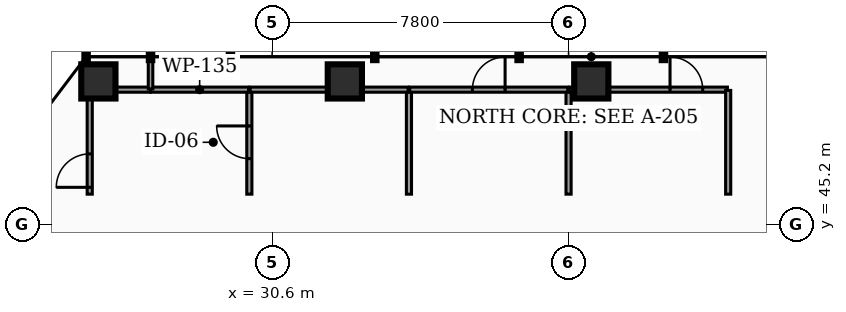
"""IFC4 building model, lengths in metres.
Left out: names, types, materials, properties, quantities, classifications, styles, units other than length and angle.
Written with IfcOpenShell. Run it as: python <this file> out.ifc"""

import sys

from ifc_helpers import new_model, si_unit, direction, frame, frame_2d, origin, origin_2d, place, context, subcontext, project, spatial, rectangle, hollow_rectangle, extrude, element, fill, save


model = new_model("IFC4")
c1 = context("Model", 3, precision=1e-05, world=origin(), true_north=direction((0.0, 1.0)))
c2 = subcontext(c1, "Body", "Model", "MODEL_VIEW")
j1 = project(units=[si_unit("LENGTHUNIT", "METRE"), si_unit("PLANEANGLEUNIT", "RADIAN")], contexts=[c1])
p1 = place(None, origin())
s1 = spatial("IfcSite", under=j1, at=p1, CompositionType="ELEMENT")
p2 = place(p1, origin())
s2 = spatial("IfcBuilding", under=s1, at=p2, CompositionType="ELEMENT")
p3 = place(p2, frame((0.0, 0.0, 88.74)))
s3 = spatial("IfcBuildingStorey", under=s2, at=p3, CompositionType="ELEMENT", Elevation=88.74)
for number, where, z_axis, x_axis in (
    (1, (38.998, 48.967, 0.0), (0.0, 0.0, 1.0), (1.0, 0.0, 0.0)),
    (2, (32.513, 48.967, 0.0), (0.0, 0.0, 1.0), (1.0, 0.0, 0.0)),
    (3, (26.028, 48.967, 0.0), (0.0, 0.0, 1.0), (1.0, 0.0, 0.0)),
):
    element("IfcColumn", number, at=place(p3, frame(where, z_axis=z_axis, x_axis=x_axis)), inside=s3, PredefinedType="COLUMN", context=c2, shape_type="SweptSolid", body=[
        extrude(hollow_rectangle(XDim=0.9, YDim=0.9, WallThickness=0.045, at=origin_2d()), origin(), (0.0, 0.0, 1.0), 3.82),
    ])
p4 = place(p3, frame((30.0, 46.0, 0.0), z_axis=(0.0, 0.0, 1.0), x_axis=(0.0, 1.0, 0.0)))
e4 = element("IfcWall", 4, at=p4, inside=s3, PredefinedType="PARTITIONING", context=c2, shape_type="SweptSolid", body=[
    extrude(rectangle(XDim=2.73, YDim=0.135, at=frame_2d((1.365, 0.0))), origin(), (0.0, 0.0, 1.0), 2.777),
])
p5 = place(p4, frame((0.935, 0.0, 0.0)))
e5 = element("IfcOpeningElement", 5, at=p5, cuts=e4, PredefinedType="OPENING", context=c2, shape_type="SweptSolid", body=[
    extrude(rectangle(XDim=0.86, YDim=2.05, at=frame_2d((0.43, 1.025))), frame((0.0, 0.077, 0.0), z_axis=(0.0, -1.0, 0.0), x_axis=(1.0, 0.0, 0.0)), (0.0, 0.0, 1.0), 0.155),
])
p6 = place(p3, frame((27.405, 48.75, 0.0), z_axis=(0.0, 0.0, 1.0), x_axis=(1.0, 0.0, 0.0)))
e6 = element("IfcWall", 6, at=p6, inside=s3, PredefinedType="PARTITIONING", context=c2, shape_type="SweptSolid", body=[
    extrude(rectangle(XDim=2.575, YDim=0.135, at=frame_2d((1.288, 0.0))), origin(), (0.0, 0.0, 1.0), 2.777),
])
p7 = place(p3, frame((25.8, 46.0, 0.0), z_axis=(0.0, 0.0, 1.0), x_axis=(0.0, 1.0, 0.0)))
e7 = element("IfcWall", 7, at=p7, inside=s3, PredefinedType="PARTITIONING", context=c2, shape_type="SweptSolid", body=[
    extrude(rectangle(XDim=2.584, YDim=0.135, at=frame_2d((1.292, 0.0))), origin(), (0.0, 0.0, 1.0), 2.777),
])
p8 = place(p7, frame((0.18, 0.0, 0.0)))
e8 = element("IfcOpeningElement", 8, at=p8, cuts=e7, PredefinedType="OPENING", context=c2, shape_type="SweptSolid", body=[
    extrude(rectangle(XDim=0.88, YDim=2.05, at=frame_2d((0.44, 1.025))), frame((0.0, 0.077, 0.0), z_axis=(0.0, -1.0, 0.0), x_axis=(1.0, 0.0, 0.0)), (0.0, 0.0, 1.0), 0.155),
])
p9 = place(p3, frame((25.966, 48.75, 0.0), z_axis=(0.0, 0.0, 1.0), x_axis=(1.0, 0.0, 0.0)))
e9 = element("IfcWall", 9, at=p9, inside=s3, PredefinedType="PARTITIONING", context=c2, shape_type="SweptSolid", body=[
    extrude(rectangle(XDim=1.429, YDim=0.135, at=frame_2d((0.715, 0.0))), origin(), (0.0, 0.0, 1.0), 2.777),
])
p10 = place(p3, frame((34.2, 46.0, 0.0), z_axis=(0.0, 0.0, 1.0), x_axis=(0.0, 1.0, 0.0)))
e10 = element("IfcWall", 10, at=p10, inside=s3, PredefinedType="PARTITIONING", context=c2, shape_type="SweptSolid", body=[
    extrude(rectangle(XDim=2.73, YDim=0.135, at=frame_2d((1.365, 0.0))), origin(), (0.0, 0.0, 1.0), 2.777),
])
p11 = place(p3, frame((30.02, 48.75, 0.0), z_axis=(0.0, 0.0, 1.0), x_axis=(1.0, 0.0, 0.0)))
e11 = element("IfcWall", 11, at=p11, inside=s3, PredefinedType="PARTITIONING", context=c2, shape_type="SweptSolid", body=[
    extrude(rectangle(XDim=4.16, YDim=0.135, at=frame_2d((2.08, 0.0))), origin(), (0.0, 0.0, 1.0), 2.777),
])
p12 = place(p3, frame((38.4, 46.0, 0.0), z_axis=(0.0, 0.0, 1.0), x_axis=(0.0, 1.0, 0.0)))
e12 = element("IfcWall", 12, at=p12, inside=s3, PredefinedType="PARTITIONING", context=c2, shape_type="SweptSolid", body=[
    extrude(rectangle(XDim=2.73, YDim=0.135, at=frame_2d((1.365, 0.0))), origin(), (0.0, 0.0, 1.0), 2.777),
])
p13 = place(p3, frame((34.22, 48.75, 0.0), z_axis=(0.0, 0.0, 1.0), x_axis=(1.0, 0.0, 0.0)))
e13 = element("IfcWall", 13, at=p13, inside=s3, PredefinedType="PARTITIONING", context=c2, shape_type="SweptSolid", body=[
    extrude(rectangle(XDim=4.16, YDim=0.135, at=frame_2d((2.08, 0.0))), origin(), (0.0, 0.0, 1.0), 2.777),
])
p14 = place(p13, frame((1.65, 0.0, 0.0)))
e14 = element("IfcOpeningElement", 14, at=p14, cuts=e13, PredefinedType="OPENING", context=c2, shape_type="SweptSolid", body=[
    extrude(rectangle(XDim=0.86, YDim=2.05, at=frame_2d((0.43, 1.025))), frame((0.0, 0.077, 0.0), z_axis=(0.0, -1.0, 0.0), x_axis=(1.0, 0.0, 0.0)), (0.0, 0.0, 1.0), 0.155),
])
p15 = place(p3, frame((38.42, 48.75, 0.0), z_axis=(0.0, 0.0, 1.0), x_axis=(1.0, 0.0, 0.0)))
e15 = element("IfcWall", 15, at=p15, inside=s3, PredefinedType="PARTITIONING", context=c2, shape_type="SweptSolid", body=[
    extrude(rectangle(XDim=4.16, YDim=0.135, at=frame_2d((2.08, 0.0))), origin(), (0.0, 0.0, 1.0), 2.777),
])
p16 = place(p15, frame((2.65, 0.0, 0.0)))
e16 = element("IfcOpeningElement", 16, at=p16, cuts=e15, PredefinedType="OPENING", context=c2, shape_type="SweptSolid", body=[
    extrude(rectangle(XDim=0.86, YDim=2.05, at=frame_2d((0.43, 1.025))), frame((0.0, 0.077, 0.0), z_axis=(0.0, -1.0, 0.0), x_axis=(1.0, 0.0, 0.0)), (0.0, 0.0, 1.0), 0.155),
])
p17 = place(p3, frame((42.6, 46.0, 0.0), z_axis=(0.0, 0.0, 1.0), x_axis=(0.0, 1.0, 0.0)))
e17 = element("IfcWall", 17, at=p17, inside=s3, PredefinedType="PARTITIONING", context=c2, shape_type="SweptSolid", body=[
    extrude(rectangle(XDim=2.73, YDim=0.135, at=frame_2d((1.365, 0.0))), origin(), (0.0, 0.0, 1.0), 2.777),
])
p18 = place(p3, frame((27.4, 48.77, 0.0), z_axis=(0.0, 0.0, 1.0), x_axis=(0.0, 1.0, 0.0)))
e18 = element("IfcWall", 18, at=p18, inside=s3, PredefinedType="PARTITIONING", context=c2, shape_type="SweptSolid", body=[
    extrude(rectangle(XDim=0.832, YDim=0.12, at=frame_2d((0.416, 0.0))), origin(), (0.0, 0.0, 1.0), 2.777),
])
p19 = place(p5, origin())
e19 = element("IfcDoor", 19, at=p19, inside=s3, OperationType="SINGLE_SWING_RIGHT", PredefinedType="DOOR", context=c2, shape_type="SweptSolid", body=[
    extrude(rectangle(XDim=0.86, YDim=2.05, at=frame_2d((0.43, 1.025))), frame((0.0, 0.025, 0.0), z_axis=(0.0, -1.0, 0.0), x_axis=(1.0, 0.0, 0.0)), (0.0, 0.0, 1.0), 0.05),
])
fill(e5, e19)
p20 = place(p8, origin())
e20 = element("IfcDoor", 20, at=p20, inside=s3, OperationType="SINGLE_SWING_LEFT", PredefinedType="DOOR", context=c2, shape_type="SweptSolid", body=[
    extrude(rectangle(XDim=0.88, YDim=2.05, at=frame_2d((0.44, 1.025))), frame((0.0, 0.025, 0.0), z_axis=(0.0, -1.0, 0.0), x_axis=(1.0, 0.0, 0.0)), (0.0, 0.0, 1.0), 0.05),
])
fill(e8, e20)
p21 = place(p14, origin())
e21 = element("IfcDoor", 21, at=p21, inside=s3, OperationType="SINGLE_SWING_RIGHT", PredefinedType="DOOR", context=c2, shape_type="SweptSolid", body=[
    extrude(rectangle(XDim=0.86, YDim=2.05, at=frame_2d((0.43, 1.025))), frame((0.0, 0.025, 0.0), z_axis=(0.0, -1.0, 0.0), x_axis=(1.0, 0.0, 0.0)), (0.0, 0.0, 1.0), 0.05),
])
fill(e14, e21)
p22 = place(p16, origin())
e22 = element("IfcDoor", 22, at=p22, inside=s3, OperationType="SINGLE_SWING_LEFT", PredefinedType="DOOR", context=c2, shape_type="SweptSolid", body=[
    extrude(rectangle(XDim=0.86, YDim=2.05, at=frame_2d((0.43, 1.025))), frame((0.0, 0.025, 0.0), z_axis=(0.0, -1.0, 0.0), x_axis=(1.0, 0.0, 0.0)), (0.0, 0.0, 1.0), 0.05),
])
fill(e16, e22)
save(model, sys.argv[1])
